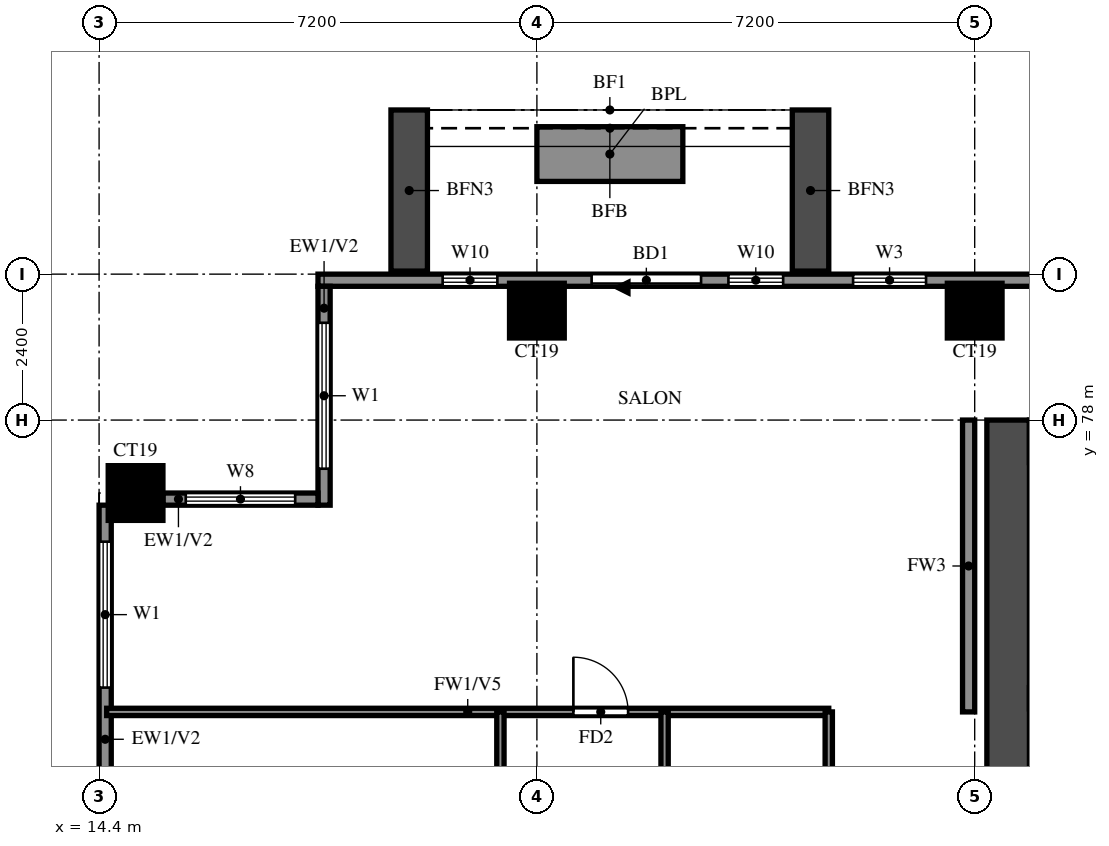
"""IFC4 building model, lengths in metres.
Left out: names, types, materials, properties, quantities, classifications, styles, units other than length and angle.
Written with IfcOpenShell. Run it as: python <this file> out.ifc"""

import sys

from ifc_helpers import new_model, si_unit, direction, frame, frame_2d, origin, origin_2d, place, context, subcontext, project, spatial, rectangle, extrude, source, transform, mapped, element, fill, save


model = new_model("IFC4")
c1 = context("Model", 3, precision=1e-05, world=origin(), true_north=direction((0.0, 1.0)))
c2 = subcontext(c1, "Body", "Model", "MODEL_VIEW")
j1 = project(units=[si_unit("LENGTHUNIT", "METRE"), si_unit("PLANEANGLEUNIT", "RADIAN")], contexts=[c1])
p1 = place(None, origin())
s1 = spatial("IfcSite", under=j1, at=p1, CompositionType="ELEMENT")
p2 = place(p1, origin())
s2 = spatial("IfcBuilding", under=s1, at=p2, CompositionType="ELEMENT")
p3 = place(p2, frame((0.0, 0.0, 130.5)))
s3 = spatial("IfcBuildingStorey", under=s2, at=p3, CompositionType="ELEMENT", Elevation=130.5)
m1 = source(origin(), c2, "Body", "SweptSolid", [
    extrude(rectangle(XDim=0.9, YDim=0.9, at=origin_2d()), origin(), (0.0, 0.0, 1.0), 3.2),
])
for number, where, z_axis, x_axis in (
    (1, (15.0, 76.8, 0.0), (0.0, 0.0, 1.0), (1.0, 0.0, 0.0)),
    (2, (21.6, 79.8, 0.0), (0.0, 0.0, 1.0), (1.0, 0.0, 0.0)),
    (3, (28.8, 79.8, 0.0), (0.0, 0.0, 1.0), (1.0, 0.0, 0.0)),
):
    element("IfcColumn", number, at=place(p3, frame(where, z_axis=z_axis, x_axis=x_axis)), inside=s3, PredefinedType="COLUMN", context=c2, shape_type="MappedRepresentation", body=[
        mapped(m1, transform((0.0, 0.0, 0.0))),
    ])
p4 = place(p3, frame((29.35, 66.1, 0.0), z_axis=(0.0, 0.0, 1.0), x_axis=(0.0, 1.0, 0.0)))
e4 = element("IfcWall", 4, at=p4, inside=s3, PredefinedType="SHEAR", context=c2, shape_type="SweptSolid", body=[
    extrude(rectangle(XDim=11.9, YDim=0.7, at=frame_2d((5.95, 0.0))), origin(), (0.0, 0.0, 1.0), 3.2),
])
p5 = place(p3, frame((82.6, 80.3, 0.0), z_axis=(0.0, 0.0, 1.0), x_axis=(-1.0, 0.0, 0.0)))
e5 = element("IfcWall", 5, at=p5, inside=s3, PredefinedType="SOLIDWALL", context=c2, shape_type="SweptSolid", body=[
    extrude(rectangle(XDim=64.6, YDim=0.2, at=frame_2d((32.3, 0.0))), origin(), (0.0, 0.0, 1.0), 3.2),
])
p6 = place(p5, frame((58.3, 0.0, 0.0)))
e6 = element("IfcOpeningElement", 6, at=p6, cuts=e5, PredefinedType="OPENING", context=c2, shape_type="SweptSolid", body=[
    extrude(rectangle(XDim=1.8, YDim=2.4, at=frame_2d((0.9, 1.2))), frame((0.0, 0.11, 0.0), z_axis=(0.0, -1.0, 0.0), x_axis=(1.0, 0.0, 0.0)), (0.0, 0.0, 1.0), 0.22),
])
p7 = place(p5, frame((54.6, 0.0, 0.6)))
e7 = element("IfcOpeningElement", 7, at=p7, cuts=e5, PredefinedType="OPENING", context=c2, shape_type="SweptSolid", body=[
    extrude(rectangle(XDim=1.2, YDim=2.4, at=frame_2d((0.6, 1.2))), frame((0.0, 0.11, 0.0), z_axis=(0.0, -1.0, 0.0), x_axis=(1.0, 0.0, 0.0)), (0.0, 0.0, 1.0), 0.22),
])
p8 = place(p5, frame((56.95, 0.0, 0.6)))
e8 = element("IfcOpeningElement", 8, at=p8, cuts=e5, PredefinedType="OPENING", context=c2, shape_type="SweptSolid", body=[
    extrude(rectangle(XDim=0.9, YDim=2.4, at=frame_2d((0.45, 1.2))), frame((0.0, 0.11, 0.0), z_axis=(0.0, -1.0, 0.0), x_axis=(1.0, 0.0, 0.0)), (0.0, 0.0, 1.0), 0.22),
])
p9 = place(p5, frame((61.65, 0.0, 0.6)))
e9 = element("IfcOpeningElement", 9, at=p9, cuts=e5, PredefinedType="OPENING", context=c2, shape_type="SweptSolid", body=[
    extrude(rectangle(XDim=0.9, YDim=2.4, at=frame_2d((0.45, 1.2))), frame((0.0, 0.11, 0.0), z_axis=(0.0, -1.0, 0.0), x_axis=(1.0, 0.0, 0.0)), (0.0, 0.0, 1.0), 0.22),
])
p10 = place(p5, frame((0.7, 0.0, 0.6)))
e10 = element("IfcOpeningElement", 10, at=p10, cuts=e5, PredefinedType="OPENING", context=c2, shape_type="SweptSolid", body=[
    extrude(rectangle(XDim=1.8, YDim=2.4, at=frame_2d((0.9, 1.2))), frame((0.0, 0.11, 0.0), z_axis=(0.0, -1.0, 0.0), x_axis=(1.0, 0.0, 0.0)), (0.0, 0.0, 1.0), 0.22),
])
p11 = place(p5, frame((4.367, 0.0, 0.6)))
e11 = element("IfcOpeningElement", 11, at=p11, cuts=e5, PredefinedType="OPENING", context=c2, shape_type="SweptSolid", body=[
    extrude(rectangle(XDim=2.4, YDim=2.4, at=frame_2d((1.2, 1.2))), frame((0.0, 0.11, 0.0), z_axis=(0.0, -1.0, 0.0), x_axis=(1.0, 0.0, 0.0)), (0.0, 0.0, 1.0), 0.22),
])
p12 = place(p5, frame((7.233, 0.0, 0.6)))
e12 = element("IfcOpeningElement", 12, at=p12, cuts=e5, PredefinedType="OPENING", context=c2, shape_type="SweptSolid", body=[
    extrude(rectangle(XDim=2.4, YDim=2.4, at=frame_2d((1.2, 1.2))), frame((0.0, 0.11, 0.0), z_axis=(0.0, -1.0, 0.0), x_axis=(1.0, 0.0, 0.0)), (0.0, 0.0, 1.0), 0.22),
])
p13 = place(p3, frame((18.1, 80.2, 0.0), z_axis=(0.0, 0.0, 1.0), x_axis=(0.0, -1.0, 0.0)))
e13 = element("IfcWall", 13, at=p13, inside=s3, PredefinedType="SOLIDWALL", context=c2, shape_type="SweptSolid", body=[
    extrude(rectangle(XDim=3.6, YDim=0.2, at=frame_2d((1.8, 0.0))), origin(), (0.0, 0.0, 1.0), 3.2),
])
p14 = place(p13, frame((0.6, 0.0, 0.6)))
e14 = element("IfcOpeningElement", 14, at=p14, cuts=e13, PredefinedType="OPENING", context=c2, shape_type="SweptSolid", body=[
    extrude(rectangle(XDim=2.4, YDim=2.4, at=frame_2d((1.2, 1.2))), frame((0.0, 0.11, 0.0), z_axis=(0.0, -1.0, 0.0), x_axis=(1.0, 0.0, 0.0)), (0.0, 0.0, 1.0), 0.22),
])
p15 = place(p3, frame((18.0, 76.7, 0.0), z_axis=(0.0, 0.0, 1.0), x_axis=(-1.0, 0.0, 0.0)))
e15 = element("IfcWall", 15, at=p15, inside=s3, PredefinedType="SOLIDWALL", context=c2, shape_type="SweptSolid", body=[
    extrude(rectangle(XDim=2.55, YDim=0.2, at=frame_2d((1.275, 0.0))), origin(), (0.0, 0.0, 1.0), 3.2),
])
p16 = place(p15, frame((0.375, 0.0, 0.6)))
e16 = element("IfcOpeningElement", 16, at=p16, cuts=e15, PredefinedType="OPENING", context=c2, shape_type="SweptSolid", body=[
    extrude(rectangle(XDim=1.8, YDim=2.4, at=frame_2d((0.9, 1.2))), frame((0.0, 0.11, 0.0), z_axis=(0.0, -1.0, 0.0), x_axis=(1.0, 0.0, 0.0)), (0.0, 0.0, 1.0), 0.22),
])
p17 = place(p3, frame((14.5, 76.6, 0.0), z_axis=(0.0, 0.0, 1.0), x_axis=(0.0, -1.0, 0.0)))
e17 = element("IfcWall", 17, at=p17, inside=s3, PredefinedType="SOLIDWALL", context=c2, shape_type="SweptSolid", body=[
    extrude(rectangle(XDim=7.0, YDim=0.2, at=frame_2d((3.5, 0.0))), origin(), (0.0, 0.0, 1.0), 3.2),
])
p18 = place(p17, frame((4.55, 0.0, 1.5)))
e18 = element("IfcOpeningElement", 18, at=p18, cuts=e17, PredefinedType="OPENING", context=c2, shape_type="SweptSolid", body=[
    extrude(rectangle(XDim=0.9, YDim=0.9, at=frame_2d((0.45, 0.45))), frame((0.0, 0.11, 0.0), z_axis=(0.0, -1.0, 0.0), x_axis=(1.0, 0.0, 0.0)), (0.0, 0.0, 1.0), 0.22),
])
p19 = place(p17, frame((0.6, 0.0, 0.6)))
e19 = element("IfcOpeningElement", 19, at=p19, cuts=e17, PredefinedType="OPENING", context=c2, shape_type="SweptSolid", body=[
    extrude(rectangle(XDim=2.4, YDim=2.4, at=frame_2d((1.2, 1.2))), frame((0.0, 0.11, 0.0), z_axis=(0.0, -1.0, 0.0), x_axis=(1.0, 0.0, 0.0)), (0.0, 0.0, 1.0), 0.22),
])
for number, where, z_axis, x_axis in (
    (20, (26.1, 80.45, 0.0), (0.0, 0.0, 1.0), (0.0, 1.0, 0.0)),
    (21, (19.5, 80.45, 0.0), (0.0, 0.0, 1.0), (0.0, 1.0, 0.0)),
):
    element("IfcWall", number, at=place(p3, frame(where, z_axis=z_axis, x_axis=x_axis)), inside=s3, PredefinedType="SOLIDWALL", context=c2, shape_type="SweptSolid", body=[
        extrude(rectangle(XDim=2.65, YDim=0.6, at=frame_2d((1.325, 0.0))), origin(), (0.0, 0.0, 1.0), 2.85),
    ])
p20 = place(p3, frame((24.0, 82.375, 0.0), z_axis=(0.0, 0.0, 1.0), x_axis=(-1.0, 0.0, 0.0)))
e22 = element("IfcWall", 22, at=p20, inside=s3, PredefinedType="SOLIDWALL", context=c2, shape_type="SweptSolid", body=[
    extrude(rectangle(XDim=2.4, YDim=0.9, at=frame_2d((1.2, 0.0))), origin(), (0.0, 0.0, 1.0), 0.9),
])
p21 = place(p3, frame((28.7, 73.2, 0.0), z_axis=(0.0, 0.0, 1.0), x_axis=(0.0, 1.0, 0.0)))
e23 = element("IfcWall", 23, at=p21, inside=s3, PredefinedType="SOLIDWALL", context=c2, shape_type="SweptSolid", body=[
    extrude(rectangle(XDim=4.8, YDim=0.2, at=frame_2d((2.4, 0.0))), origin(), (0.0, 0.0, 1.0), 3.2),
])
p22 = place(p3, frame((14.525, 73.2, 0.0), z_axis=(0.0, 0.0, 1.0), x_axis=(1.0, 0.0, 0.0)))
e24 = element("IfcWall", 24, at=p22, inside=s3, PredefinedType="PARTITIONING", context=c2, shape_type="SweptSolid", body=[
    extrude(rectangle(XDim=11.875, YDim=0.12, at=frame_2d((5.938, 0.0))), origin(), (0.0, 0.0, 1.0), 2.3),
])
p23 = place(p22, frame((7.675, 0.0, 0.0)))
e25 = element("IfcOpeningElement", 25, at=p23, cuts=e24, PredefinedType="OPENING", context=c2, shape_type="SweptSolid", body=[
    extrude(rectangle(XDim=0.9, YDim=2.1, at=frame_2d((0.45, 1.05))), frame((0.0, 0.07, 0.0), z_axis=(0.0, -1.0, 0.0), x_axis=(1.0, 0.0, 0.0)), (0.0, 0.0, 1.0), 0.14),
])
p24 = place(p3, frame((21.0, 69.6, 0.0), z_axis=(0.0, 0.0, 1.0), x_axis=(0.0, 1.0, 0.0)))
e26 = element("IfcWall", 26, at=p24, inside=s3, PredefinedType="PARTITIONING", context=c2, shape_type="SweptSolid", body=[
    extrude(rectangle(XDim=3.6, YDim=0.12, at=frame_2d((1.8, 0.0))), origin(), (0.0, 0.0, 1.0), 3.2),
])
p25 = place(p3, frame((23.7, 61.2, 0.0), z_axis=(0.0, 0.0, 1.0), x_axis=(0.0, 1.0, 0.0)))
e27 = element("IfcWall", 27, at=p25, inside=s3, PredefinedType="PARTITIONING", context=c2, shape_type="SweptSolid", body=[
    extrude(rectangle(XDim=12.0, YDim=0.12, at=frame_2d((6.0, 0.0))), origin(), (0.0, 0.0, 1.0), 3.2),
])
p26 = place(p25, frame((4.55, 0.0, 0.0)))
e28 = element("IfcOpeningElement", 28, at=p26, cuts=e27, PredefinedType="OPENING", context=c2, shape_type="SweptSolid", body=[
    extrude(rectangle(XDim=0.9, YDim=2.1, at=frame_2d((0.45, 1.05))), frame((0.0, 0.07, 0.0), z_axis=(0.0, -1.0, 0.0), x_axis=(1.0, 0.0, 0.0)), (0.0, 0.0, 1.0), 0.14),
])
p27 = place(p25, frame((9.3, 0.0, 0.0)))
e29 = element("IfcOpeningElement", 29, at=p27, cuts=e27, PredefinedType="OPENING", context=c2, shape_type="SweptSolid", body=[
    extrude(rectangle(XDim=0.8, YDim=2.1, at=frame_2d((0.4, 1.05))), frame((0.0, 0.07, 0.0), z_axis=(0.0, -1.0, 0.0), x_axis=(1.0, 0.0, 0.0)), (0.0, 0.0, 1.0), 0.14),
])
p28 = place(p3, frame((26.4, 68.6, 0.0), z_axis=(0.0, 0.0, 1.0), x_axis=(0.0, 1.0, 0.0)))
e30 = element("IfcWall", 30, at=p28, inside=s3, PredefinedType="PARTITIONING", context=c2, shape_type="SweptSolid", body=[
    extrude(rectangle(XDim=4.6, YDim=0.12, at=frame_2d((2.3, 0.0))), origin(), (0.0, 0.0, 1.0), 3.2),
])
p29 = place(p6, origin())
e31 = element("IfcDoor", 31, at=p29, inside=s3, OperationType="DOUBLE_DOOR_SLIDING", PredefinedType="DOOR", context=c2, shape_type="SweptSolid", body=[
    extrude(rectangle(XDim=1.8, YDim=2.4, at=frame_2d((0.9, 1.2))), frame((0.0, 0.025, 0.0), z_axis=(0.0, -1.0, 0.0), x_axis=(1.0, 0.0, 0.0)), (0.0, 0.0, 1.0), 0.05),
])
fill(e6, e31)
p30 = place(p7, origin())
e32 = element("IfcWindow", 32, at=p30, inside=s3, PartitioningType="SINGLE_PANEL", PredefinedType="WINDOW", context=c2, shape_type="SweptSolid", body=[
    extrude(rectangle(XDim=1.2, YDim=2.4, at=frame_2d((0.6, 1.2))), frame((0.0, 0.03, 0.0), z_axis=(0.0, -1.0, 0.0), x_axis=(1.0, 0.0, 0.0)), (0.0, 0.0, 1.0), 0.06),
])
fill(e7, e32)
p31 = place(p8, origin())
e33 = element("IfcWindow", 33, at=p31, inside=s3, PartitioningType="SINGLE_PANEL", PredefinedType="WINDOW", context=c2, shape_type="SweptSolid", body=[
    extrude(rectangle(XDim=0.9, YDim=2.4, at=frame_2d((0.45, 1.2))), frame((0.0, 0.03, 0.0), z_axis=(0.0, -1.0, 0.0), x_axis=(1.0, 0.0, 0.0)), (0.0, 0.0, 1.0), 0.06),
])
fill(e8, e33)
p32 = place(p9, origin())
e34 = element("IfcWindow", 34, at=p32, inside=s3, PartitioningType="SINGLE_PANEL", PredefinedType="WINDOW", context=c2, shape_type="SweptSolid", body=[
    extrude(rectangle(XDim=0.9, YDim=2.4, at=frame_2d((0.45, 1.2))), frame((0.0, 0.03, 0.0), z_axis=(0.0, -1.0, 0.0), x_axis=(1.0, 0.0, 0.0)), (0.0, 0.0, 1.0), 0.06),
])
fill(e9, e34)
p33 = place(p14, origin())
e35 = element("IfcWindow", 35, at=p33, inside=s3, PartitioningType="DOUBLE_PANEL_VERTICAL", PredefinedType="WINDOW", context=c2, shape_type="SweptSolid", body=[
    extrude(rectangle(XDim=2.4, YDim=2.4, at=frame_2d((1.2, 1.2))), frame((0.0, 0.03, 0.0), z_axis=(0.0, -1.0, 0.0), x_axis=(1.0, 0.0, 0.0)), (0.0, 0.0, 1.0), 0.06),
])
fill(e14, e35)
p34 = place(p16, origin())
e36 = element("IfcWindow", 36, at=p34, inside=s3, PartitioningType="DOUBLE_PANEL_VERTICAL", PredefinedType="WINDOW", context=c2, shape_type="SweptSolid", body=[
    extrude(rectangle(XDim=1.8, YDim=2.4, at=frame_2d((0.9, 1.2))), frame((0.0, 0.03, 0.0), z_axis=(0.0, -1.0, 0.0), x_axis=(1.0, 0.0, 0.0)), (0.0, 0.0, 1.0), 0.06),
])
fill(e16, e36)
p35 = place(p19, origin())
e37 = element("IfcWindow", 37, at=p35, inside=s3, PartitioningType="DOUBLE_PANEL_VERTICAL", PredefinedType="WINDOW", context=c2, shape_type="SweptSolid", body=[
    extrude(rectangle(XDim=2.4, YDim=2.4, at=frame_2d((1.2, 1.2))), frame((0.0, 0.03, 0.0), z_axis=(0.0, -1.0, 0.0), x_axis=(1.0, 0.0, 0.0)), (0.0, 0.0, 1.0), 0.06),
])
fill(e19, e37)
p36 = place(p23, origin())
e38 = element("IfcDoor", 38, at=p36, inside=s3, OperationType="SINGLE_SWING_LEFT", PredefinedType="DOOR", context=c2, shape_type="SweptSolid", body=[
    extrude(rectangle(XDim=0.9, YDim=2.1, at=frame_2d((0.45, 1.05))), frame((0.0, 0.025, 0.0), z_axis=(0.0, -1.0, 0.0), x_axis=(1.0, 0.0, 0.0)), (0.0, 0.0, 1.0), 0.05),
])
fill(e25, e38)
save(model, sys.argv[1])
